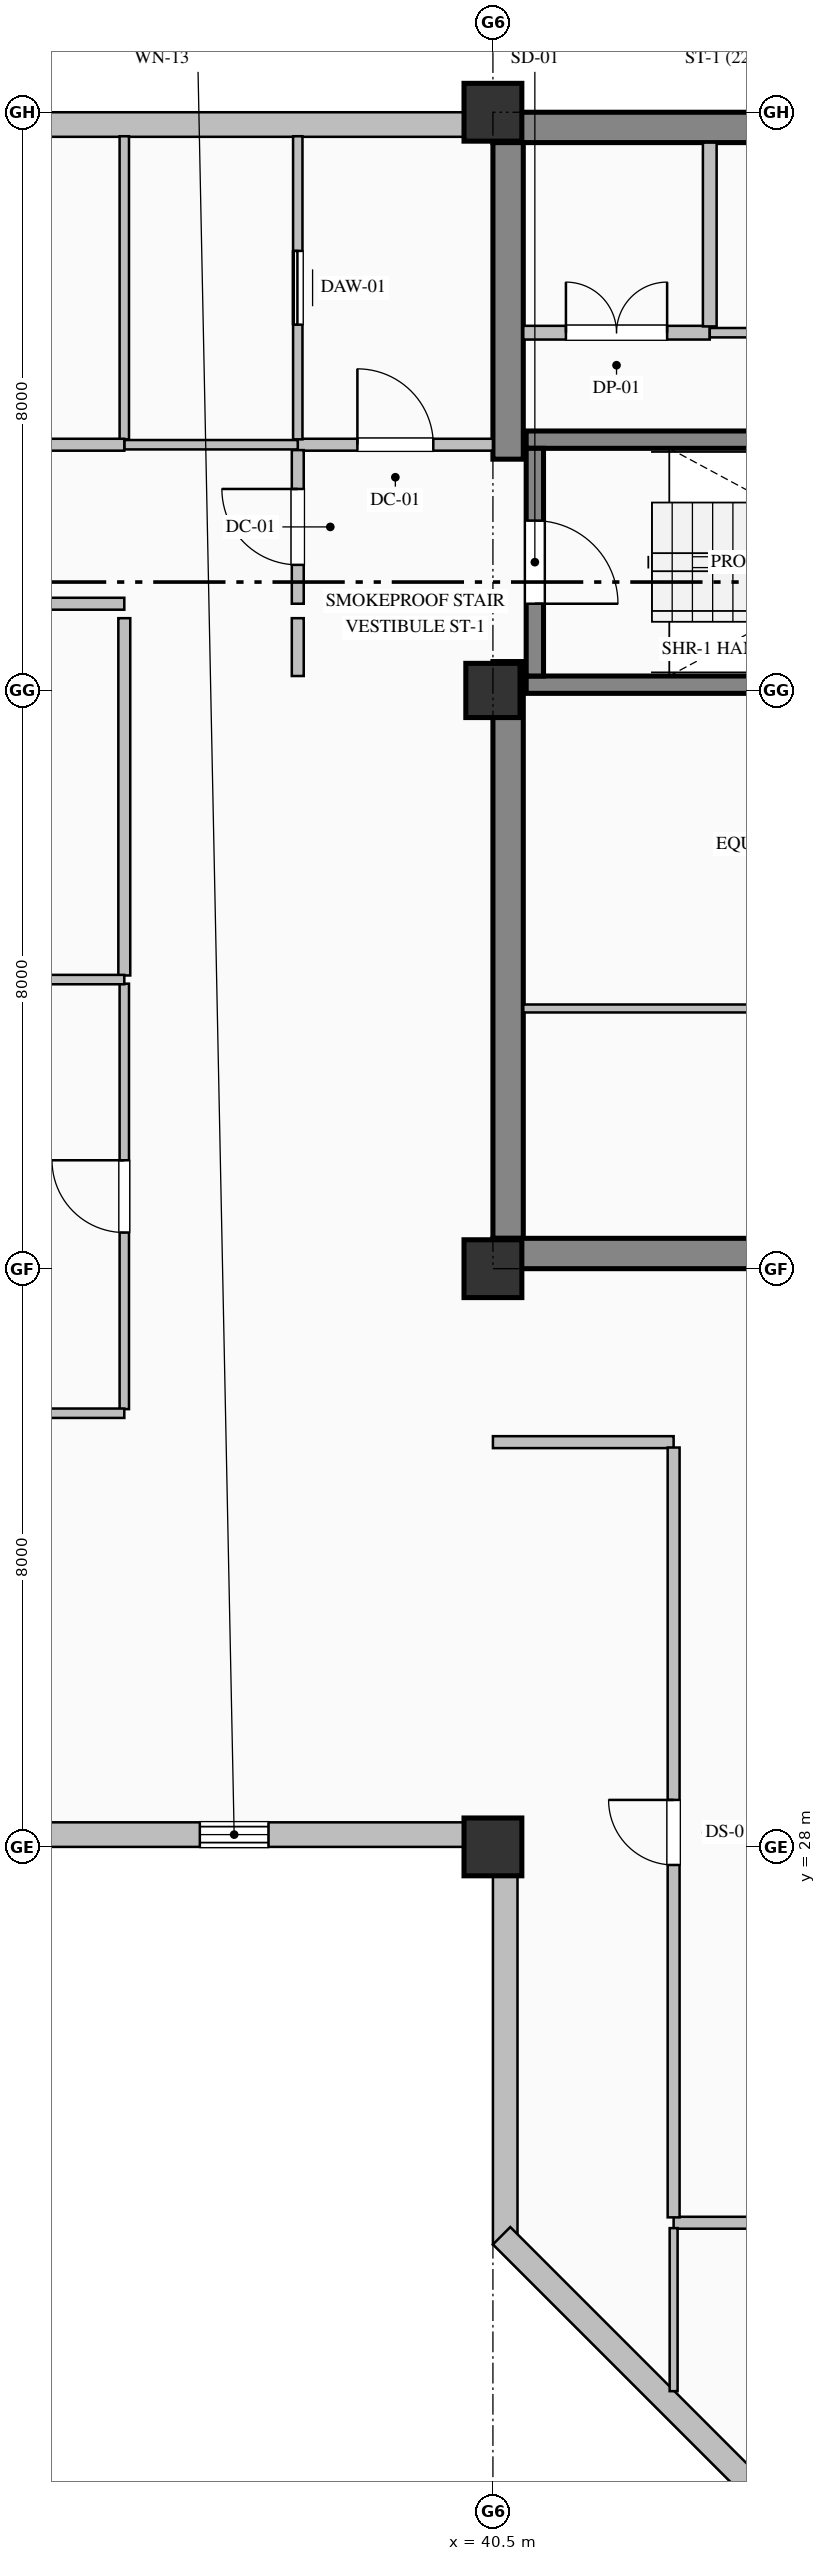
"""IFC4 building model, lengths in metres.
Left out: names, types, materials, properties, quantities, classifications, styles, units other than length and angle.
Written with IfcOpenShell. Run it as: python <this file> out.ifc"""

import sys

from ifc_helpers import new_model, si_unit, direction, frame, frame_2d, origin, origin_2d, place, context, subcontext, project, spatial, rectangle, hollow_rectangle, extrude, element, fill, save


model = new_model("IFC4")
c1 = context("Model", 3, precision=1e-05, world=origin(), true_north=direction((0.0, 1.0)))
c2 = subcontext(c1, "Body", "Model", "MODEL_VIEW")
j1 = project(units=[si_unit("LENGTHUNIT", "METRE"), si_unit("PLANEANGLEUNIT", "RADIAN")], contexts=[c1])
p1 = place(None, origin())
s1 = spatial("IfcSite", under=j1, at=p1, CompositionType="ELEMENT")
p2 = place(p1, origin())
s2 = spatial("IfcBuilding", under=s1, at=p2, CompositionType="ELEMENT")
p3 = place(p2, frame((0.0, 0.0, 343.2)))
s3 = spatial("IfcBuildingStorey", under=s2, at=p3, CompositionType="ELEMENT", Elevation=343.2)
p4 = place(p3, frame((40.5, 51.79, 0.0), z_axis=(0.0, 0.0, 1.0), x_axis=(1.0, 0.0, 0.0)))
e1 = element("IfcWall", 1, at=p4, inside=s3, PredefinedType="SHEAR", context=c2, shape_type="SweptSolid", body=[
    extrude(rectangle(XDim=23.5, YDim=0.42, at=frame_2d((11.75, 0.0))), origin(), (0.0, 0.0, 1.0), 3.785),
])
p5 = place(p3, frame((40.71, 36.42, 0.0), z_axis=(0.0, 0.0, 1.0), x_axis=(0.0, 1.0, 0.0)))
e2 = element("IfcWall", 2, at=p5, inside=s3, PredefinedType="SHEAR", context=c2, shape_type="SweptSolid", body=[
    extrude(rectangle(XDim=7.98, YDim=0.42, at=frame_2d((3.99, 0.0))), origin(), (0.0, 0.0, 1.0), 3.785),
])
p6 = place(p3, frame((40.71, 47.2, 0.0), z_axis=(0.0, 0.0, 1.0), x_axis=(0.0, 1.0, 0.0)))
e3 = element("IfcWall", 3, at=p6, inside=s3, PredefinedType="SHEAR", context=c2, shape_type="SweptSolid", body=[
    extrude(rectangle(XDim=4.38, YDim=0.42, at=frame_2d((2.19, 0.0))), origin(), (0.0, 0.0, 1.0), 3.785),
])
p7 = place(p3, frame((40.5, 36.21, 0.0), z_axis=(0.0, 0.0, 1.0), x_axis=(1.0, 0.0, 0.0)))
e4 = element("IfcWall", 4, at=p7, inside=s3, PredefinedType="SHEAR", context=c2, shape_type="SweptSolid", body=[
    extrude(rectangle(XDim=9.1, YDim=0.42, at=frame_2d((4.55, 0.0))), origin(), (0.0, 0.0, 1.0), 3.785),
])
for number, where, z_axis, x_axis in (
    (5, (40.5, 28.0, 0.0), (0.0, 0.0, 1.0), (1.0, 0.0, 0.0)),
    (6, (40.5, 36.0, 0.0), (0.0, 0.0, 1.0), (1.0, 0.0, 0.0)),
):
    element("IfcColumn", number, at=place(p3, frame(where, z_axis=z_axis, x_axis=x_axis)), inside=s3, PredefinedType="COLUMN", context=c2, shape_type="SweptSolid", body=[
        extrude(hollow_rectangle(XDim=0.8, YDim=0.8, WallThickness=0.032, at=origin_2d()), origin(), (0.0, 0.0, 1.0), 4.0),
    ])
p8 = place(p3, frame((40.5, 44.0, 0.0), z_axis=(0.0, 0.0, 1.0), x_axis=(1.0, 0.0, 0.0)))
e7 = element("IfcColumn", 7, at=p8, inside=s3, PredefinedType="COLUMN", context=c2, shape_type="SweptSolid", body=[
    extrude(rectangle(XDim=0.75, YDim=0.75, at=origin_2d()), origin(), (0.0, 0.0, 1.0), 4.0),
])
p9 = place(p3, frame((40.5, 52.0, 0.0), z_axis=(0.0, 0.0, 1.0), x_axis=(1.0, 0.0, 0.0)))
e8 = element("IfcColumn", 8, at=p9, inside=s3, PredefinedType="COLUMN", context=c2, shape_type="SweptSolid", body=[
    extrude(hollow_rectangle(XDim=0.8, YDim=0.8, WallThickness=0.032, at=origin_2d()), origin(), (0.0, 0.0, 1.0), 4.0),
])
p10 = place(p3, frame((40.67, 22.5, 0.0), z_axis=(0.0, 0.0, 1.0), x_axis=(0.0, 1.0, 0.0)))
e9 = element("IfcWall", 9, at=p10, inside=s3, PredefinedType="SOLIDWALL", context=c2, shape_type="SweptSolid", body=[
    extrude(rectangle(XDim=5.84, YDim=0.34, at=frame_2d((2.92, 0.0))), origin(), (0.0, 0.0, 1.0), 3.185),
])
p11 = place(p3, frame((40.52, 28.17, 0.0), z_axis=(0.0, 0.0, 1.0), x_axis=(-1.0, 0.0, 0.0)))
e10 = element("IfcWall", 10, at=p11, inside=s3, PredefinedType="SOLIDWALL", context=c2, shape_type="SweptSolid", body=[
    extrude(rectangle(XDim=20.02, YDim=0.34, at=frame_2d((10.01, 0.0))), origin(), (0.0, 0.0, 1.0), 3.185),
])
p12 = place(p11, frame((3.125, 0.0, 0.9)))
e11 = element("IfcOpeningElement", 11, at=p12, cuts=e10, PredefinedType="OPENING", context=c2, shape_type="SweptSolid", body=[
    extrude(rectangle(XDim=0.95, YDim=1.85, at=frame_2d((0.475, 0.925))), frame((0.0, 0.18, 0.0), z_axis=(0.0, -1.0, 0.0), x_axis=(1.0, 0.0, 0.0)), (0.0, 0.0, 1.0), 0.36),
])
p13 = place(p11, frame((10.125, 0.0, 0.9)))
e12 = element("IfcOpeningElement", 12, at=p13, cuts=e10, PredefinedType="OPENING", context=c2, shape_type="SweptSolid", body=[
    extrude(rectangle(XDim=1.35, YDim=1.85, at=frame_2d((0.675, 0.925))), frame((0.0, 0.18, 0.0), z_axis=(0.0, -1.0, 0.0), x_axis=(1.0, 0.0, 0.0)), (0.0, 0.0, 1.0), 0.36),
])
p14 = place(p3, frame((20.5, 51.83, 0.0), z_axis=(0.0, 0.0, 1.0), x_axis=(1.0, 0.0, 0.0)))
e13 = element("IfcWall", 13, at=p14, inside=s3, PredefinedType="SOLIDWALL", context=c2, shape_type="SweptSolid", body=[
    extrude(rectangle(XDim=20.02, YDim=0.34, at=frame_2d((10.01, 0.0))), origin(), (0.0, 0.0, 1.0), 3.335),
])
p15 = place(p3, frame((44.62, 18.62, 0.0), z_axis=(0.0, 0.0, 1.0), x_axis=(-0.707106781187, 0.707106781187, 0.0)))
e14 = element("IfcWall", 14, at=p15, inside=s3, PredefinedType="SOLIDWALL", context=c2, shape_type="SweptSolid", body=[
    extrude(rectangle(XDim=5.657, YDim=0.34, at=frame_2d((2.828, 0.0))), origin(), (0.0, 0.0, 1.0), 3.785),
])
for number, where, z_axis, x_axis in (
    (15, (40.96, 47.47, 0.0), (0.0, 0.0, 1.0), (1.0, 0.0, 0.0)),
    (16, (49.04, 44.08, 0.0), (0.0, 0.0, 1.0), (-1.0, 0.0, 0.0)),
):
    element("IfcWall", number, at=place(p3, frame(where, z_axis=z_axis, x_axis=x_axis)), inside=s3, PredefinedType="SOLIDWALL", context=c2, shape_type="SweptSolid", body=[
        extrude(rectangle(XDim=8.08, YDim=0.24, at=frame_2d((4.04, 0.0))), origin(), (0.0, 0.0, 1.0), 4.0),
    ])
p16 = place(p3, frame((41.08, 47.35, 0.0), z_axis=(0.0, 0.0, 1.0), x_axis=(0.0, -1.0, 0.0)))
e17 = element("IfcWall", 17, at=p16, inside=s3, PredefinedType="SOLIDWALL", context=c2, shape_type="SweptSolid", body=[
    extrude(rectangle(XDim=3.15, YDim=0.24, at=frame_2d((1.575, 0.0))), origin(), (0.0, 0.0, 1.0), 4.0),
])
p17 = place(p16, frame((1.0, 0.0, 0.0)))
e18 = element("IfcOpeningElement", 18, at=p17, cuts=e17, PredefinedType="OPENING", context=c2, shape_type="SweptSolid", body=[
    extrude(rectangle(XDim=1.15, YDim=2.2, at=frame_2d((0.575, 1.1))), frame((0.0, 0.13, 0.0), z_axis=(0.0, -1.0, 0.0), x_axis=(1.0, 0.0, 0.0)), (0.0, 0.0, 1.0), 0.26),
])
p18 = place(p3, frame((37.8, 47.4, 0.0), z_axis=(0.0, 0.0, 1.0), x_axis=(1.0, 0.0, 0.0)))
e19 = element("IfcWall", 19, at=p18, inside=s3, PredefinedType="PARTITIONING", context=c2, shape_type="SweptSolid", body=[
    extrude(rectangle(XDim=2.7, YDim=0.165, at=frame_2d((1.35, 0.0))), origin(), (0.0, 0.0, 1.0), 3.785),
])
p19 = place(p18, frame((0.825, 0.0, 0.0)))
e20 = element("IfcOpeningElement", 20, at=p19, cuts=e19, PredefinedType="OPENING", context=c2, shape_type="SweptSolid", body=[
    extrude(rectangle(XDim=1.05, YDim=2.15, at=frame_2d((0.525, 1.075))), frame((0.0, 0.093, 0.0), z_axis=(0.0, -1.0, 0.0), x_axis=(1.0, 0.0, 0.0)), (0.0, 0.0, 1.0), 0.185),
])
p20 = place(p3, frame((37.8, 45.2, 0.0), z_axis=(0.0, 0.0, 1.0), x_axis=(0.0, 1.0, 0.0)))
e21 = element("IfcWall", 21, at=p20, inside=s3, PredefinedType="PARTITIONING", context=c2, shape_type="SweptSolid", body=[
    extrude(rectangle(XDim=2.125, YDim=0.165, at=frame_2d((1.063, 0.0))), origin(), (0.0, 0.0, 1.0), 3.785),
])
p21 = place(p20, frame((0.538, 0.0, 0.0)))
e22 = element("IfcOpeningElement", 22, at=p21, cuts=e21, PredefinedType="OPENING", context=c2, shape_type="SweptSolid", body=[
    extrude(rectangle(XDim=1.05, YDim=2.15, at=frame_2d((0.525, 1.075))), frame((0.0, 0.093, 0.0), z_axis=(0.0, -1.0, 0.0), x_axis=(1.0, 0.0, 0.0)), (0.0, 0.0, 1.0), 0.185),
])
p22 = place(p3, frame((37.8, 44.2, 0.0), z_axis=(0.0, 0.0, 1.0), x_axis=(0.0, 1.0, 0.0)))
e23 = element("IfcWall", 23, at=p22, inside=s3, PredefinedType="PARTITIONING", context=c2, shape_type="SweptSolid", body=[
    extrude(rectangle(XDim=0.8, YDim=0.165, at=frame_2d((0.4, 0.0))), origin(), (0.0, 0.0, 1.0), 3.785),
])
p23 = place(p3, frame((37.8, 47.475, 0.0), z_axis=(0.0, 0.0, 1.0), x_axis=(0.0, 1.0, 0.0)))
e24 = element("IfcWall", 24, at=p23, inside=s3, PredefinedType="PARTITIONING", context=c2, shape_type="SweptSolid", body=[
    extrude(rectangle(XDim=4.193, YDim=0.13, at=frame_2d((2.097, 0.0))), origin(), (0.0, 0.0, 1.0), 3.785),
])
p24 = place(p23, frame((1.587, 0.0, 0.0)))
e25 = element("IfcOpeningElement", 25, at=p24, cuts=e24, PredefinedType="OPENING", context=c2, shape_type="SweptSolid", body=[
    extrude(rectangle(XDim=1.02, YDim=2.15, at=frame_2d((0.51, 1.075))), frame((0.0, 0.075, 0.0), z_axis=(0.0, -1.0, 0.0), x_axis=(1.0, 0.0, 0.0)), (0.0, 0.0, 1.0), 0.15),
])
p25 = place(p3, frame((37.8, 47.4, 0.0), z_axis=(0.0, 0.0, 1.0), x_axis=(-1.0, 0.0, 0.0)))
e26 = element("IfcWall", 26, at=p25, inside=s3, PredefinedType="PARTITIONING", context=c2, shape_type="SweptSolid", body=[
    extrude(rectangle(XDim=2.4, YDim=0.13, at=frame_2d((1.2, 0.0))), origin(), (0.0, 0.0, 1.0), 3.785),
])
p26 = place(p3, frame((35.4, 47.475, 0.0), z_axis=(0.0, 0.0, 1.0), x_axis=(0.0, 1.0, 0.0)))
e27 = element("IfcWall", 27, at=p26, inside=s3, PredefinedType="PARTITIONING", context=c2, shape_type="SweptSolid", body=[
    extrude(rectangle(XDim=4.193, YDim=0.13, at=frame_2d((2.097, 0.0))), origin(), (0.0, 0.0, 1.0), 3.785),
])
p27 = place(p3, frame((40.92, 48.95, 0.0), z_axis=(0.0, 0.0, 1.0), x_axis=(1.0, 0.0, 0.0)))
e28 = element("IfcWall", 28, at=p27, inside=s3, PredefinedType="PARTITIONING", context=c2, shape_type="SweptSolid", body=[
    extrude(rectangle(XDim=2.58, YDim=0.19, at=frame_2d((1.29, 0.0))), origin(), (0.0, 0.0, 1.0), 3.785),
])
p28 = place(p27, frame((0.59, 0.0, 0.0)))
e29 = element("IfcOpeningElement", 29, at=p28, cuts=e28, PredefinedType="OPENING", context=c2, shape_type="SweptSolid", body=[
    extrude(rectangle(XDim=1.4, YDim=2.25, at=frame_2d((0.7, 1.125))), frame((0.0, 0.105, 0.0), z_axis=(0.0, -1.0, 0.0), x_axis=(1.0, 0.0, 0.0)), (0.0, 0.0, 1.0), 0.21),
])
p29 = place(p3, frame((43.5, 48.95, 0.0), z_axis=(0.0, 0.0, 1.0), x_axis=(1.0, 0.0, 0.0)))
e30 = element("IfcWall", 30, at=p29, inside=s3, PredefinedType="PARTITIONING", context=c2, shape_type="SweptSolid", body=[
    extrude(rectangle(XDim=5.733, YDim=0.13, at=frame_2d((2.866, 0.0))), origin(), (0.0, 0.0, 1.0), 3.785),
])
p30 = place(p29, frame((2.406, 0.0, 0.0)))
e31 = element("IfcOpeningElement", 31, at=p30, cuts=e30, PredefinedType="OPENING", context=c2, shape_type="SweptSolid", body=[
    extrude(rectangle(XDim=0.92, YDim=2.15, at=frame_2d((0.46, 1.075))), frame((0.0, 0.075, 0.0), z_axis=(0.0, -1.0, 0.0), x_axis=(1.0, 0.0, 0.0)), (0.0, 0.0, 1.0), 0.15),
])
p31 = place(p3, frame((40.92, 39.6, 0.0), z_axis=(0.0, 0.0, 1.0), x_axis=(1.0, 0.0, 0.0)))
e32 = element("IfcWall", 32, at=p31, inside=s3, PredefinedType="MOVABLE", context=c2, shape_type="SweptSolid", body=[
    extrude(rectangle(XDim=8.48, YDim=0.11, at=frame_2d((4.24, 0.0))), origin(), (0.0, 0.0, 1.0), 3.785),
])
p32 = place(p3, frame((43.5, 51.58, 0.0), z_axis=(0.0, 0.0, 1.0), x_axis=(0.0, -1.0, 0.0)))
e33 = element("IfcWall", 33, at=p32, inside=s3, PredefinedType="PARTITIONING", context=c2, shape_type="SweptSolid", body=[
    extrude(rectangle(XDim=2.543, YDim=0.19, at=frame_2d((1.271, 0.0))), origin(), (0.0, 0.0, 1.0), 3.785),
])
p33 = place(p3, frame((27.5, 47.4, 0.0), z_axis=(0.0, 0.0, 1.0), x_axis=(1.0, 0.0, 0.0)))
e34 = element("IfcWall", 34, at=p33, inside=s3, PredefinedType="PARTITIONING", context=c2, shape_type="SweptSolid", body=[
    extrude(rectangle(XDim=7.9, YDim=0.165, at=frame_2d((3.95, 0.0))), origin(), (0.0, 0.0, 1.0), 3.785),
])
p34 = place(p33, frame((3.45, 0.0, 0.0)))
e35 = element("IfcOpeningElement", 35, at=p34, cuts=e34, PredefinedType="OPENING", context=c2, shape_type="SweptSolid", body=[
    extrude(rectangle(XDim=1.0, YDim=2.15, at=frame_2d((0.5, 1.075))), frame((0.0, 0.093, 0.0), z_axis=(0.0, -1.0, 0.0), x_axis=(1.0, 0.0, 0.0)), (0.0, 0.0, 1.0), 0.185),
])
p35 = place(p3, frame((35.4, 45.2, 0.0), z_axis=(0.0, 0.0, 1.0), x_axis=(-1.0, 0.0, 0.0)))
e36 = element("IfcWall", 36, at=p35, inside=s3, PredefinedType="PARTITIONING", context=c2, shape_type="SweptSolid", body=[
    extrude(rectangle(XDim=9.4, YDim=0.165, at=frame_2d((4.7, 0.0))), origin(), (0.0, 0.0, 1.0), 3.785),
])
p36 = place(p35, frame((4.2, 0.0, 0.0)))
e37 = element("IfcOpeningElement", 37, at=p36, cuts=e36, PredefinedType="OPENING", context=c2, shape_type="SweptSolid", body=[
    extrude(rectangle(XDim=1.0, YDim=2.15, at=frame_2d((0.5, 1.075))), frame((0.0, 0.093, 0.0), z_axis=(0.0, -1.0, 0.0), x_axis=(1.0, 0.0, 0.0)), (0.0, 0.0, 1.0), 0.185),
])
p37 = place(p3, frame((35.4, 34.057, 0.0), z_axis=(0.0, 0.0, 1.0), x_axis=(0.0, 1.0, 0.0)))
e38 = element("IfcWall", 38, at=p37, inside=s3, PredefinedType="PARTITIONING", context=c2, shape_type="SweptSolid", body=[
    extrude(rectangle(XDim=5.886, YDim=0.13, at=frame_2d((2.943, 0.0))), origin(), (0.0, 0.0, 1.0), 3.785),
])
p38 = place(p37, frame((2.443, 0.0, 0.0)))
e39 = element("IfcOpeningElement", 39, at=p38, cuts=e38, PredefinedType="OPENING", context=c2, shape_type="SweptSolid", body=[
    extrude(rectangle(XDim=1.0, YDim=2.15, at=frame_2d((0.5, 1.075))), frame((0.0, 0.075, 0.0), z_axis=(0.0, -1.0, 0.0), x_axis=(1.0, 0.0, 0.0)), (0.0, 0.0, 1.0), 0.15),
])
p39 = place(p3, frame((35.4, 40.057, 0.0), z_axis=(0.0, 0.0, 1.0), x_axis=(0.0, 1.0, 0.0)))
e40 = element("IfcWall", 40, at=p39, inside=s3, PredefinedType="PARTITIONING", context=c2, shape_type="SweptSolid", body=[
    extrude(rectangle(XDim=4.943, YDim=0.165, at=frame_2d((2.472, 0.0))), origin(), (0.0, 0.0, 1.0), 3.785),
])
p40 = place(p3, frame((43.0, 33.6, 0.0), z_axis=(0.0, 0.0, 1.0), x_axis=(-1.0, 0.0, 0.0)))
e41 = element("IfcWall", 41, at=p40, inside=s3, PredefinedType="PARTITIONING", context=c2, shape_type="SweptSolid", body=[
    extrude(rectangle(XDim=2.5, YDim=0.165, at=frame_2d((1.25, 0.0))), origin(), (0.0, 0.0, 1.0), 3.785),
])
p41 = place(p3, frame((45.2, 22.8, 0.0), z_axis=(0.0, 0.0, 1.0), x_axis=(-1.0, 0.0, 0.0)))
e42 = element("IfcWall", 42, at=p41, inside=s3, PredefinedType="PARTITIONING", context=c2, shape_type="SweptSolid", body=[
    extrude(rectangle(XDim=2.2, YDim=0.165, at=frame_2d((1.1, 0.0))), origin(), (0.0, 0.0, 1.0), 3.785),
])
p42 = place(p3, frame((43.0, 22.875, 0.0), z_axis=(0.0, 0.0, 1.0), x_axis=(0.0, 1.0, 0.0)))
e43 = element("IfcWall", 43, at=p42, inside=s3, PredefinedType="PARTITIONING", context=c2, shape_type="SweptSolid", body=[
    extrude(rectangle(XDim=10.651, YDim=0.165, at=frame_2d((5.325, 0.0))), origin(), (0.0, 0.0, 1.0), 3.785),
])
p43 = place(p42, frame((4.875, 0.0, 0.0)))
e44 = element("IfcOpeningElement", 44, at=p43, cuts=e43, PredefinedType="OPENING", context=c2, shape_type="SweptSolid", body=[
    extrude(rectangle(XDim=0.9, YDim=2.15, at=frame_2d((0.45, 1.075))), frame((0.0, 0.093, 0.0), z_axis=(0.0, -1.0, 0.0), x_axis=(1.0, 0.0, 0.0)), (0.0, 0.0, 1.0), 0.185),
])
p44 = place(p3, frame((43.0, 20.469, 0.0), z_axis=(0.0, 0.0, 1.0), x_axis=(0.0, 1.0, 0.0)))
e45 = element("IfcWall", 45, at=p44, inside=s3, PredefinedType="MOVABLE", context=c2, shape_type="SweptSolid", body=[
    extrude(rectangle(XDim=2.256, YDim=0.11, at=frame_2d((1.128, 0.0))), origin(), (0.0, 0.0, 1.0), 3.785),
])
p45 = place(p3, frame((26.0, 34.0, 0.0), z_axis=(0.0, 0.0, 1.0), x_axis=(1.0, 0.0, 0.0)))
e46 = element("IfcWall", 46, at=p45, inside=s3, PredefinedType="PARTITIONING", context=c2, shape_type="SweptSolid", body=[
    extrude(rectangle(XDim=9.4, YDim=0.13, at=frame_2d((4.7, 0.0))), origin(), (0.0, 0.0, 1.0), 3.785),
])
p46 = place(p45, frame((4.2, 0.0, 0.0)))
e47 = element("IfcOpeningElement", 47, at=p46, cuts=e46, PredefinedType="OPENING", context=c2, shape_type="SweptSolid", body=[
    extrude(rectangle(XDim=1.0, YDim=2.15, at=frame_2d((0.5, 1.075))), frame((0.0, 0.075, 0.0), z_axis=(0.0, -1.0, 0.0), x_axis=(1.0, 0.0, 0.0)), (0.0, 0.0, 1.0), 0.15),
])
p47 = place(p3, frame((26.0, 40.0, 0.0), z_axis=(0.0, 0.0, 1.0), x_axis=(1.0, 0.0, 0.0)))
e48 = element("IfcWall", 48, at=p47, inside=s3, PredefinedType="PARTITIONING", context=c2, shape_type="SweptSolid", body=[
    extrude(rectangle(XDim=9.4, YDim=0.13, at=frame_2d((4.7, 0.0))), origin(), (0.0, 0.0, 1.0), 3.785),
])
p48 = place(p12, origin())
e49 = element("IfcWindow", 49, at=p48, inside=s3, PartitioningType="SINGLE_PANEL", PredefinedType="WINDOW", context=c2, shape_type="SweptSolid", body=[
    extrude(rectangle(XDim=0.95, YDim=1.85, at=frame_2d((0.475, 0.925))), frame((0.0, 0.15, 0.0), z_axis=(0.0, -1.0, 0.0), x_axis=(1.0, 0.0, 0.0)), (0.0, 0.0, 1.0), 0.06),
])
fill(e11, e49)
p49 = place(p17, origin())
e50 = element("IfcDoor", 50, at=p49, inside=s3, OperationType="SINGLE_SWING_RIGHT", PredefinedType="DOOR", context=c2, shape_type="SweptSolid", body=[
    extrude(rectangle(XDim=1.15, YDim=2.2, at=frame_2d((0.575, 1.1))), frame((0.0, 0.025, 0.0), z_axis=(0.0, -1.0, 0.0), x_axis=(1.0, 0.0, 0.0)), (0.0, 0.0, 1.0), 0.05),
])
fill(e18, e50)
p50 = place(p19, origin())
e51 = element("IfcDoor", 51, at=p50, inside=s3, OperationType="SINGLE_SWING_LEFT", PredefinedType="DOOR", context=c2, shape_type="SweptSolid", body=[
    extrude(rectangle(XDim=1.05, YDim=2.15, at=frame_2d((0.525, 1.075))), frame((0.0, 0.025, 0.0), z_axis=(0.0, -1.0, 0.0), x_axis=(1.0, 0.0, 0.0)), (0.0, 0.0, 1.0), 0.05),
])
fill(e20, e51)
p51 = place(p21, origin())
e52 = element("IfcDoor", 52, at=p51, inside=s3, OperationType="SINGLE_SWING_RIGHT", PredefinedType="DOOR", context=c2, shape_type="SweptSolid", body=[
    extrude(rectangle(XDim=1.05, YDim=2.15, at=frame_2d((0.525, 1.075))), frame((0.0, 0.025, 0.0), z_axis=(0.0, -1.0, 0.0), x_axis=(1.0, 0.0, 0.0)), (0.0, 0.0, 1.0), 0.05),
])
fill(e22, e52)
p52 = place(p24, origin())
e53 = element("IfcDoor", 53, at=p52, inside=s3, OperationType="SLIDING_TO_LEFT", PredefinedType="DOOR", context=c2, shape_type="SweptSolid", body=[
    extrude(rectangle(XDim=1.02, YDim=2.15, at=frame_2d((0.51, 1.075))), frame((0.0, 0.025, 0.0), z_axis=(0.0, -1.0, 0.0), x_axis=(1.0, 0.0, 0.0)), (0.0, 0.0, 1.0), 0.05),
])
fill(e25, e53)
p53 = place(p28, origin())
e54 = element("IfcDoor", 54, at=p53, inside=s3, OperationType="DOUBLE_DOOR_SINGLE_SWING", PredefinedType="DOOR", context=c2, shape_type="SweptSolid", body=[
    extrude(rectangle(XDim=1.4, YDim=2.25, at=frame_2d((0.7, 1.125))), frame((0.0, 0.025, 0.0), z_axis=(0.0, -1.0, 0.0), x_axis=(1.0, 0.0, 0.0)), (0.0, 0.0, 1.0), 0.05),
])
fill(e29, e54)
p54 = place(p38, origin())
e55 = element("IfcDoor", 55, at=p54, inside=s3, OperationType="SINGLE_SWING_RIGHT", PredefinedType="DOOR", context=c2, shape_type="SweptSolid", body=[
    extrude(rectangle(XDim=1.0, YDim=2.15, at=frame_2d((0.5, 1.075))), frame((0.0, 0.025, 0.0), z_axis=(0.0, -1.0, 0.0), x_axis=(1.0, 0.0, 0.0)), (0.0, 0.0, 1.0), 0.05),
])
fill(e39, e55)
p55 = place(p43, origin())
e56 = element("IfcDoor", 56, at=p55, inside=s3, OperationType="SINGLE_SWING_RIGHT", PredefinedType="DOOR", context=c2, shape_type="SweptSolid", body=[
    extrude(rectangle(XDim=0.9, YDim=2.15, at=frame_2d((0.45, 1.075))), frame((0.0, 0.025, 0.0), z_axis=(0.0, -1.0, 0.0), x_axis=(1.0, 0.0, 0.0)), (0.0, 0.0, 1.0), 0.05),
])
fill(e44, e56)
save(model, sys.argv[1])
